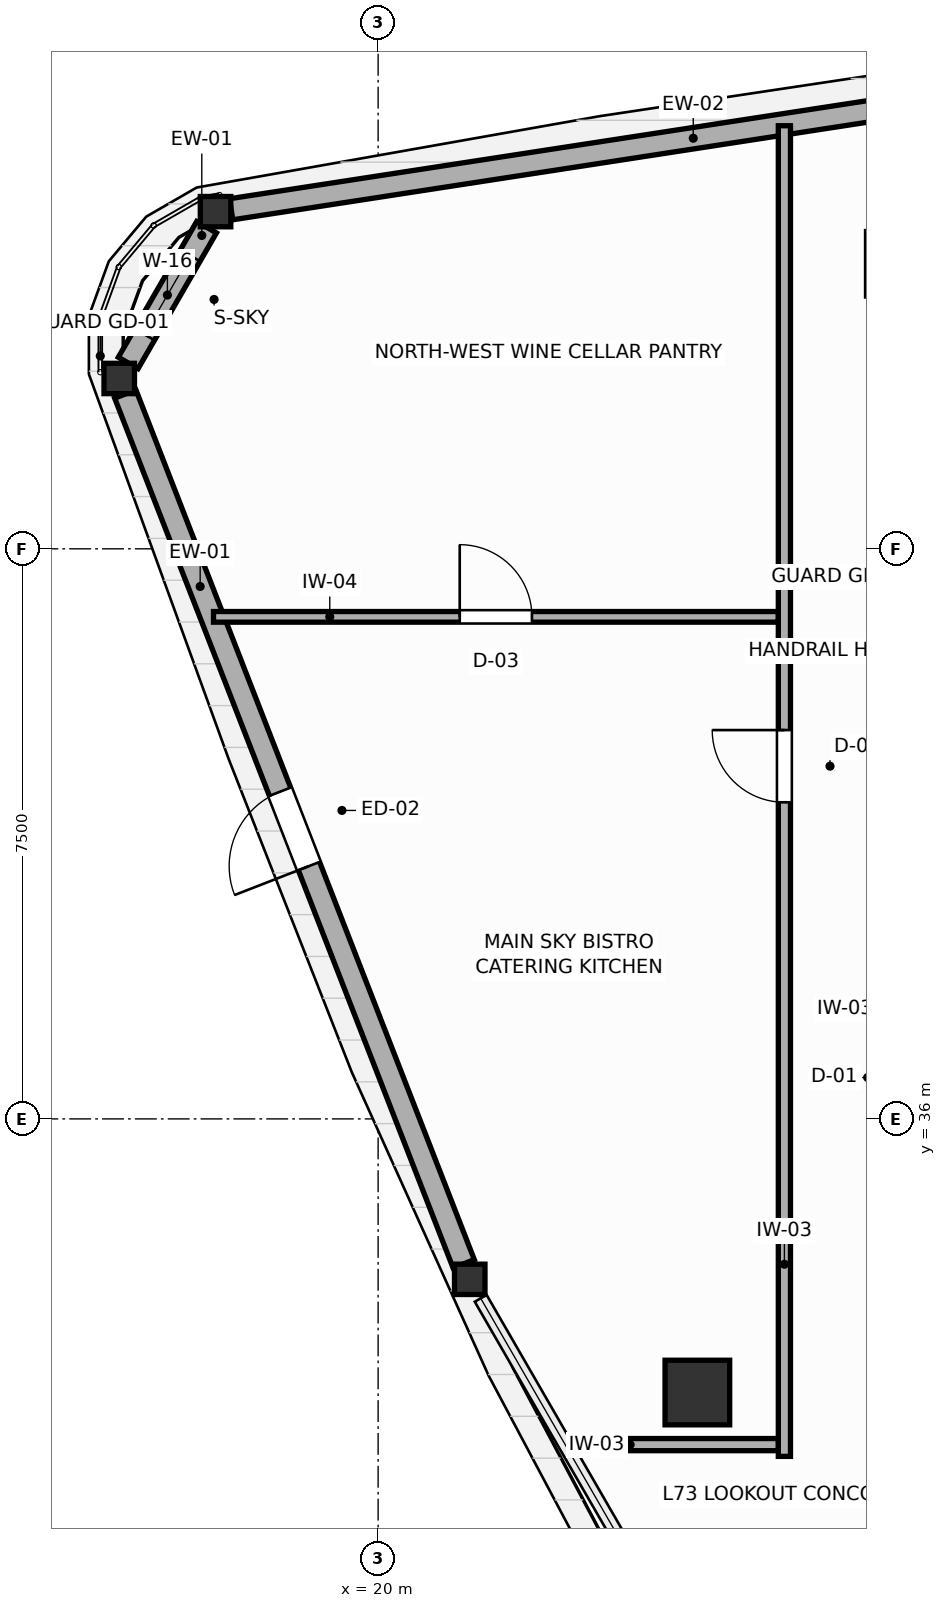
"""IFC4 building model, lengths in metres.
Left out: names, types, materials, properties, quantities, classifications, styles, units other than length and angle.
Written with IfcOpenShell. Run it as: python <this file> out.ifc"""

import sys

from ifc_helpers import new_model, si_unit, direction, frame, frame_2d, origin, origin_2d, place, context, subcontext, project, spatial, rectangle, i_section, extrude, source, transform, mapped, element, fill, save


model = new_model("IFC4")
c1 = context("Model", 3, precision=1e-05, world=origin(), true_north=direction((0.0, 1.0)))
c2 = subcontext(c1, "Body", "Model", "MODEL_VIEW")
j1 = project(units=[si_unit("LENGTHUNIT", "METRE"), si_unit("PLANEANGLEUNIT", "RADIAN")], contexts=[c1])
p1 = place(None, origin())
s1 = spatial("IfcSite", under=j1, at=p1, CompositionType="ELEMENT")
p2 = place(p1, origin())
s2 = spatial("IfcBuilding", under=s1, at=p2, CompositionType="ELEMENT")
p3 = place(p2, frame((0.0, 0.0, 279.6)))
s3 = spatial("IfcBuildingStorey", under=s2, at=p3, CompositionType="ELEMENT", Elevation=279.6)
m1 = source(origin(), c2, "Body", "SweptSolid", [
    extrude(rectangle(XDim=0.85, YDim=0.85, at=origin_2d()), origin(), (0.0, 0.0, 1.0), 4.2),
])
for number, where, z_axis, x_axis in (
    (1, (26.85, 47.25, 0.0), (0.0, 0.0, 1.0), (1.0, 0.0, 0.0)),
    (2, (24.2, 32.4, 0.0), (0.0, 0.0, 1.0), (1.0, 0.0, 0.0)),
):
    element("IfcColumn", number, at=place(p3, frame(where, z_axis=z_axis, x_axis=x_axis)), inside=s3, PredefinedType="COLUMN", context=c2, shape_type="MappedRepresentation", body=[
        mapped(m1, transform((0.0, 0.0, 0.0), scale=1.0)),
    ])
m2 = source(origin(), c2, "Body", "SweptSolid", [
    extrude(i_section(OverallWidth=0.401, OverallDepth=0.399, WebThickness=0.022, FlangeThickness=0.036, FilletRadius=0.015, at=origin_2d()), origin(), (0.0, 0.0, 1.0), 4.2),
])
for number, where, z_axis, x_axis in (
    (3, (17.861, 47.936, 0.0), (0.0, 0.0, 1.0), (1.0, 0.0, 0.0)),
    (4, (16.594, 45.741, 0.0), (0.0, 0.0, 1.0), (1.0, 0.0, 0.0)),
    (5, (21.205, 33.889, 0.0), (0.0, 0.0, 1.0), (1.0, 0.0, 0.0)),
):
    element("IfcColumn", number, at=place(p3, frame(where, z_axis=z_axis, x_axis=x_axis)), inside=s3, PredefinedType="COLUMN", context=c2, shape_type="MappedRepresentation", body=[
        mapped(m2, transform((0.0, 0.0, 0.0), scale=1.0)),
    ])
p4 = place(p3, frame((30.225, 49.836, 0.0), z_axis=(0.0, 0.0, 1.0), x_axis=(-0.988391650679, -0.151927432902, 0.0)))
e6 = element("IfcWall", 6, at=p4, inside=s3, PredefinedType="SOLIDWALL", context=c2, shape_type="SweptSolid", body=[
    extrude(rectangle(XDim=12.301, YDim=0.28, at=frame_2d((6.151, 0.0))), origin(), (0.0, 0.0, 1.0), 2.52),
])
p5 = place(p3, frame((17.743, 47.731, 0.0), z_axis=(0.0, 0.0, 1.0), x_axis=(-0.499883026796, -0.866092927763, 0.0)))
e7 = element("IfcWall", 7, at=p5, inside=s3, PredefinedType="SOLIDWALL", context=c2, shape_type="SweptSolid", body=[
    extrude(rectangle(XDim=2.062, YDim=0.3, at=frame_2d((1.031, 0.0))), origin(), (0.0, 0.0, 1.0), 2.52),
])
p6 = place(p5, frame((0.431, 0.0, 0.75)))
e8 = element("IfcOpeningElement", 8, at=p6, cuts=e7, PredefinedType="OPENING", context=c2, shape_type="SweptSolid", body=[
    extrude(rectangle(XDim=1.2, YDim=1.55, at=frame_2d((0.6, 0.775))), frame((0.0, 0.16, 0.0), z_axis=(0.0, -1.0, 0.0), x_axis=(1.0, 0.0, 0.0)), (0.0, 0.0, 1.0), 0.32),
])
p7 = place(p3, frame((16.674, 45.536, 0.0), z_axis=(0.0, 0.0, 1.0), x_axis=(0.362611301042, -0.931940472539, 0.0)))
e9 = element("IfcWall", 9, at=p7, inside=s3, PredefinedType="SOLIDWALL", context=c2, shape_type="SweptSolid", body=[
    extrude(rectangle(XDim=12.278, YDim=0.3, at=frame_2d((6.139, 0.0))), origin(), (0.0, 0.0, 1.0), 2.52),
])
p8 = place(p7, frame((5.614, 0.0, 0.0)))
e10 = element("IfcOpeningElement", 10, at=p8, cuts=e9, PredefinedType="OPENING", context=c2, shape_type="SweptSolid", body=[
    extrude(rectangle(XDim=1.05, YDim=2.1, at=frame_2d((0.525, 1.05))), frame((0.0, 0.16, 0.0), z_axis=(0.0, -1.0, 0.0), x_axis=(1.0, 0.0, 0.0)), (0.0, 0.0, 1.0), 0.32),
])
p9 = place(p3, frame((25.345, 31.56, 0.0), z_axis=(0.0, 0.0, 1.0), x_axis=(0.0, 1.0, 0.0)))
e11 = element("IfcWall", 11, at=p9, inside=s3, PredefinedType="PARTITIONING", context=c2, shape_type="SweptSolid", body=[
    extrude(rectangle(XDim=17.506, YDim=0.16, at=frame_2d((8.753, 0.0))), origin(), (0.0, 0.0, 1.0), 3.96),
])
p10 = place(p9, frame((8.605, 0.0, 0.0)))
e12 = element("IfcOpeningElement", 12, at=p10, cuts=e11, PredefinedType="OPENING", context=c2, shape_type="SweptSolid", body=[
    extrude(rectangle(XDim=0.95, YDim=2.05, at=frame_2d((0.475, 1.025))), frame((0.0, 0.09, 0.0), z_axis=(0.0, -1.0, 0.0), x_axis=(1.0, 0.0, 0.0)), (0.0, 0.0, 1.0), 0.18),
])
p11 = place(p3, frame((22.481, 31.715, 0.0), z_axis=(0.0, 0.0, 1.0), x_axis=(1.0, 0.0, 0.0)))
e13 = element("IfcWall", 13, at=p11, inside=s3, PredefinedType="PARTITIONING", context=c2, shape_type="SweptSolid", body=[
    extrude(rectangle(XDim=2.782, YDim=0.16, at=frame_2d((1.391, 0.0))), origin(), (0.0, 0.0, 1.0), 3.96),
])
p12 = place(p3, frame((17.834, 42.605, 0.0), z_axis=(0.0, 0.0, 1.0), x_axis=(1.0, 0.0, 0.0)))
e14 = element("IfcWall", 14, at=p12, inside=s3, PredefinedType="PARTITIONING", context=c2, shape_type="SweptSolid", body=[
    extrude(rectangle(XDim=7.429, YDim=0.14, at=frame_2d((3.714, 0.0))), origin(), (0.0, 0.0, 1.0), 3.96),
])
p13 = place(p12, frame((3.24, 0.0, 0.0)))
e15 = element("IfcOpeningElement", 15, at=p13, cuts=e14, PredefinedType="OPENING", context=c2, shape_type="SweptSolid", body=[
    extrude(rectangle(XDim=0.95, YDim=2.05, at=frame_2d((0.475, 1.025))), frame((0.0, 0.08, 0.0), z_axis=(0.0, -1.0, 0.0), x_axis=(1.0, 0.0, 0.0)), (0.0, 0.0, 1.0), 0.16),
])
p14 = place(p6, origin())
e16 = element("IfcWindow", 16, at=p14, inside=s3, PartitioningType="SINGLE_PANEL", PredefinedType="WINDOW", context=c2, shape_type="SweptSolid", body=[
    extrude(rectangle(XDim=1.2, YDim=1.55, at=frame_2d((0.6, 0.775))), frame((0.0, 0.03, 0.0), z_axis=(0.0, -1.0, 0.0), x_axis=(1.0, 0.0, 0.0)), (0.0, 0.0, 1.0), 0.06),
])
fill(e8, e16)
p15 = place(p8, frame((1.05, 0.0, 0.0), z_axis=(0.0, 0.0, 1.0), x_axis=(-1.0, 0.0, 0.0)))
e17 = element("IfcDoor", 17, at=p15, inside=s3, OperationType="SINGLE_SWING_LEFT", PredefinedType="DOOR", context=c2, shape_type="SweptSolid", body=[
    extrude(rectangle(XDim=1.05, YDim=2.1, at=frame_2d((0.525, 1.05))), frame((0.0, 0.025, 0.0), z_axis=(0.0, -1.0, 0.0), x_axis=(1.0, 0.0, 0.0)), (0.0, 0.0, 1.0), 0.05),
])
fill(e10, e17)
p16 = place(p10, origin())
e18 = element("IfcDoor", 18, at=p16, inside=s3, OperationType="SINGLE_SWING_RIGHT", PredefinedType="DOOR", context=c2, shape_type="SweptSolid", body=[
    extrude(rectangle(XDim=0.95, YDim=2.05, at=frame_2d((0.475, 1.025))), frame((0.0, 0.025, 0.0), z_axis=(0.0, -1.0, 0.0), x_axis=(1.0, 0.0, 0.0)), (0.0, 0.0, 1.0), 0.05),
])
fill(e12, e18)
p17 = place(p13, origin())
e19 = element("IfcDoor", 19, at=p17, inside=s3, OperationType="SINGLE_SWING_LEFT", PredefinedType="DOOR", context=c2, shape_type="SweptSolid", body=[
    extrude(rectangle(XDim=0.95, YDim=2.05, at=frame_2d((0.475, 1.025))), frame((0.0, 0.025, 0.0), z_axis=(0.0, -1.0, 0.0), x_axis=(1.0, 0.0, 0.0)), (0.0, 0.0, 1.0), 0.05),
])
fill(e15, e19)
save(model, sys.argv[1])
